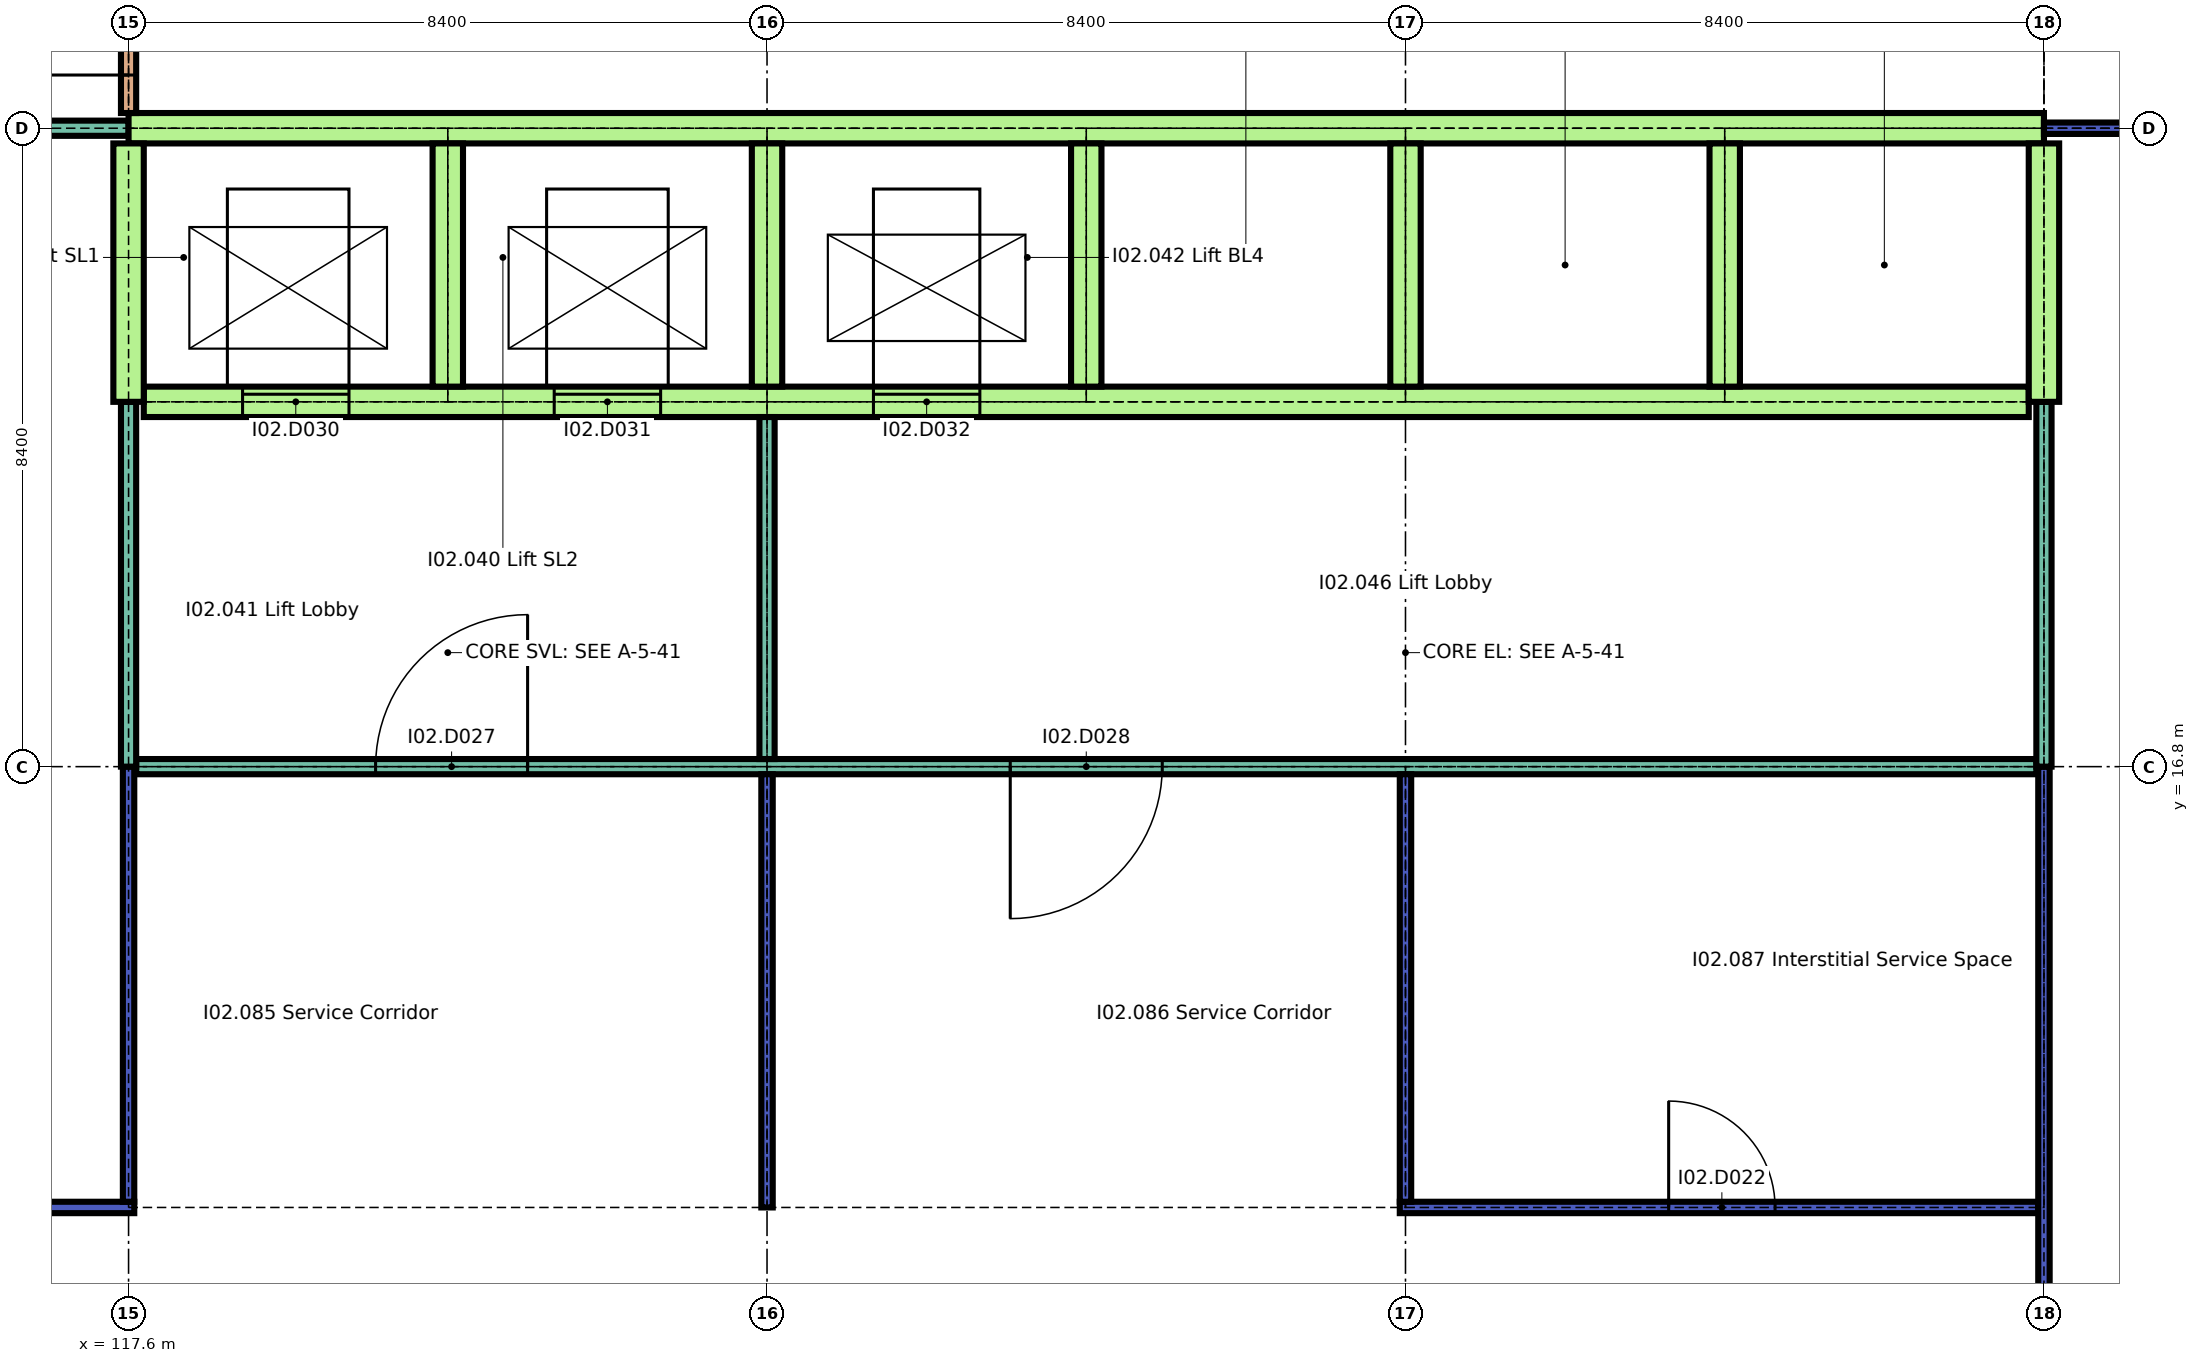
"""IFC4 building model, lengths in metres.
Left out: names, types, materials, properties, quantities, classifications, styles, units other than length and angle.
Written with IfcOpenShell. Run it as: python <this file> out.ifc"""

import sys

from ifc_helpers import new_model, si_unit, direction, frame, frame_2d, origin, place, context, subcontext, project, spatial, rectangle, extrude, element, fill, save


model = new_model("IFC4")
c1 = context("Model", 3, precision=1e-05, world=origin(), true_north=direction((0.0, 1.0)))
c2 = subcontext(c1, "Body", "Model", "MODEL_VIEW")
j1 = project(units=[si_unit("LENGTHUNIT", "METRE"), si_unit("PLANEANGLEUNIT", "RADIAN")], contexts=[c1])
p1 = place(None, origin())
s1 = spatial("IfcSite", under=j1, at=p1, CompositionType="ELEMENT")
p2 = place(p1, origin())
s2 = spatial("IfcBuilding", under=s1, at=p2, CompositionType="ELEMENT")
p3 = place(p2, frame((0.0, 0.0, 12.9)))
s3 = spatial("IfcBuildingStorey", under=s2, at=p3, CompositionType="ELEMENT", Elevation=12.9)
p4 = place(p3, frame((99.125, 11.0, 0.0), z_axis=(0.0, 0.0, 1.0), x_axis=(1.0, 0.0, 0.0)))
e1 = element("IfcWall", 1, at=p4, inside=s3, PredefinedType="PARTITIONING", context=c2, shape_type="SweptSolid", body=[
    extrude(rectangle(XDim=18.55, YDim=0.15, at=frame_2d((9.275, 0.0))), origin(), (0.0, 0.0, 1.0), 2.04),
])
p5 = place(p4, frame((8.575, 0.0, 0.0)))
e2 = element("IfcOpeningElement", 2, at=p5, cuts=e1, PredefinedType="OPENING", context=c2, shape_type="SweptSolid", body=[
    extrude(rectangle(XDim=1.4, YDim=2.0, at=frame_2d((0.7, 1.0))), frame((0.0, 0.085, 0.0), z_axis=(0.0, -1.0, 0.0), x_axis=(1.0, 0.0, 0.0)), (0.0, 0.0, 1.0), 0.17),
])
p6 = place(p3, frame((134.325, 11.0, 0.0), z_axis=(0.0, 0.0, 1.0), x_axis=(1.0, 0.0, 0.0)))
e3 = element("IfcWall", 3, at=p6, inside=s3, PredefinedType="PARTITIONING", context=c2, shape_type="SweptSolid", body=[
    extrude(rectangle(XDim=8.4, YDim=0.15, at=frame_2d((4.2, 0.0))), origin(), (0.0, 0.0, 1.0), 2.04),
])
p7 = place(p6, frame((3.538, 0.0, 0.0)))
e4 = element("IfcOpeningElement", 4, at=p7, cuts=e3, PredefinedType="OPENING", context=c2, shape_type="SweptSolid", body=[
    extrude(rectangle(XDim=1.4, YDim=2.0, at=frame_2d((0.7, 1.0))), frame((0.0, 0.085, 0.0), z_axis=(0.0, -1.0, 0.0), x_axis=(1.0, 0.0, 0.0)), (0.0, 0.0, 1.0), 0.17),
])
p8 = place(p3, frame((117.7, 16.8, 0.0), z_axis=(0.0, 0.0, 1.0), x_axis=(1.0, 0.0, 0.0)))
e5 = element("IfcWall", 5, at=p8, inside=s3, PredefinedType="PARTITIONING", context=c2, shape_type="SweptSolid", body=[
    extrude(rectangle(XDim=25.0, YDim=0.2, at=frame_2d((12.5, 0.0))), origin(), (0.0, 0.0, 1.0), 2.04),
])
p9 = place(p8, frame((3.15, 0.0, 0.0)))
e6 = element("IfcOpeningElement", 6, at=p9, cuts=e5, PredefinedType="OPENING", context=c2, shape_type="SweptSolid", body=[
    extrude(rectangle(XDim=2.0, YDim=2.0, at=frame_2d((1.0, 1.0))), frame((0.0, 0.11, 0.0), z_axis=(0.0, -1.0, 0.0), x_axis=(1.0, 0.0, 0.0)), (0.0, 0.0, 1.0), 0.22),
])
p10 = place(p8, frame((11.5, 0.0, 0.0)))
e7 = element("IfcOpeningElement", 7, at=p10, cuts=e5, PredefinedType="OPENING", context=c2, shape_type="SweptSolid", body=[
    extrude(rectangle(XDim=2.0, YDim=2.0, at=frame_2d((1.0, 1.0))), frame((0.0, 0.11, 0.0), z_axis=(0.0, -1.0, 0.0), x_axis=(1.0, 0.0, 0.0)), (0.0, 0.0, 1.0), 0.22),
])
p11 = place(p3, frame((117.8, 21.6, 0.0), z_axis=(0.0, 0.0, 1.0), x_axis=(1.0, 0.0, 0.0)))
e8 = element("IfcWall", 8, at=p11, inside=s3, PredefinedType="SHEAR", context=c2, shape_type="SweptSolid", body=[
    extrude(rectangle(XDim=24.8, YDim=0.4, at=frame_2d((12.4, 0.0))), origin(), (0.0, 0.0, 1.0), 2.04),
])
p12 = place(p11, frame((1.3, 0.0, 0.0)))
e9 = element("IfcOpeningElement", 9, at=p12, cuts=e8, PredefinedType="OPENING", context=c2, shape_type="SweptSolid", body=[
    extrude(rectangle(XDim=1.4, YDim=2.0, at=frame_2d((0.7, 1.0))), frame((0.0, 0.21, 0.0), z_axis=(0.0, -1.0, 0.0), x_axis=(1.0, 0.0, 0.0)), (0.0, 0.0, 1.0), 0.42),
])
p13 = place(p11, frame((5.4, 0.0, 0.0)))
e10 = element("IfcOpeningElement", 10, at=p13, cuts=e8, PredefinedType="OPENING", context=c2, shape_type="SweptSolid", body=[
    extrude(rectangle(XDim=1.4, YDim=2.0, at=frame_2d((0.7, 1.0))), frame((0.0, 0.21, 0.0), z_axis=(0.0, -1.0, 0.0), x_axis=(1.0, 0.0, 0.0)), (0.0, 0.0, 1.0), 0.42),
])
p14 = place(p11, frame((9.6, 0.0, 0.0)))
e11 = element("IfcOpeningElement", 11, at=p14, cuts=e8, PredefinedType="OPENING", context=c2, shape_type="SweptSolid", body=[
    extrude(rectangle(XDim=1.4, YDim=2.0, at=frame_2d((0.7, 1.0))), frame((0.0, 0.21, 0.0), z_axis=(0.0, -1.0, 0.0), x_axis=(1.0, 0.0, 0.0)), (0.0, 0.0, 1.0), 0.42),
])
p15 = place(p3, frame((109.2, 25.2, 0.0), z_axis=(0.0, 0.0, 1.0), x_axis=(1.0, 0.0, 0.0)))
e12 = element("IfcWall", 12, at=p15, inside=s3, PredefinedType="PARTITIONING", context=c2, shape_type="SweptSolid", body=[
    extrude(rectangle(XDim=8.4, YDim=0.2, at=frame_2d((4.2, 0.0))), origin(), (0.0, 0.0, 1.0), 2.04),
])
p16 = place(p3, frame((117.6, 25.2, 0.0), z_axis=(0.0, 0.0, 1.0), x_axis=(1.0, 0.0, 0.0)))
e13 = element("IfcWall", 13, at=p16, inside=s3, PredefinedType="SHEAR", context=c2, shape_type="SweptSolid", body=[
    extrude(rectangle(XDim=25.2, YDim=0.4, at=frame_2d((12.6, 0.0))), origin(), (0.0, 0.0, 1.0), 2.04),
])
p17 = place(p3, frame((142.8, 25.2, 0.0), z_axis=(0.0, 0.0, 1.0), x_axis=(1.0, 0.0, 0.0)))
e14 = element("IfcWall", 14, at=p17, inside=s3, PredefinedType="PARTITIONING", context=c2, shape_type="SweptSolid", body=[
    extrude(rectangle(XDim=7.975, YDim=0.15, at=frame_2d((3.987, 0.0))), origin(), (0.0, 0.0, 1.0), 2.04),
])
p18 = place(p3, frame((117.6, 11.075, 0.0), z_axis=(0.0, 0.0, 1.0), x_axis=(0.0, 1.0, 0.0)))
e15 = element("IfcWall", 15, at=p18, inside=s3, PredefinedType="PARTITIONING", context=c2, shape_type="SweptSolid", body=[
    extrude(rectangle(XDim=5.725, YDim=0.15, at=frame_2d((2.863, 0.0))), origin(), (0.0, 0.0, 1.0), 2.04),
])
p19 = place(p3, frame((117.6, 16.8, 0.0), z_axis=(0.0, 0.0, 1.0), x_axis=(0.0, 1.0, 0.0)))
e16 = element("IfcWall", 16, at=p19, inside=s3, PredefinedType="PARTITIONING", context=c2, shape_type="SweptSolid", body=[
    extrude(rectangle(XDim=4.8, YDim=0.2, at=frame_2d((2.4, 0.0))), origin(), (0.0, 0.0, 1.0), 2.04),
])
p20 = place(p3, frame((117.6, 21.6, 0.0), z_axis=(0.0, 0.0, 1.0), x_axis=(0.0, 1.0, 0.0)))
e17 = element("IfcWall", 17, at=p20, inside=s3, PredefinedType="SHEAR", context=c2, shape_type="SweptSolid", body=[
    extrude(rectangle(XDim=3.4, YDim=0.4, at=frame_2d((1.7, 0.0))), origin(), (0.0, 0.0, 1.0), 2.04),
])
p21 = place(p3, frame((117.6, 25.4, 0.0), z_axis=(0.0, 0.0, 1.0), x_axis=(0.0, 1.0, 0.0)))
e18 = element("IfcWall", 18, at=p21, inside=s3, PredefinedType="PARTITIONING", context=c2, shape_type="SweptSolid", body=[
    extrude(rectangle(XDim=4.6, YDim=0.2, at=frame_2d((2.3, 0.0))), origin(), (0.0, 0.0, 1.0), 2.1),
])
p22 = place(p21, frame((0.5, 0.0, 0.0)))
e19 = element("IfcOpeningElement", 19, at=p22, cuts=e18, PredefinedType="OPENING", context=c2, shape_type="SweptSolid", body=[
    extrude(rectangle(XDim=1.4, YDim=2.0, at=frame_2d((0.7, 1.0))), frame((0.0, 0.11, 0.0), z_axis=(0.0, -1.0, 0.0), x_axis=(1.0, 0.0, 0.0)), (0.0, 0.0, 1.0), 0.22),
])
p23 = place(p3, frame((121.8, 21.8, 0.0), z_axis=(0.0, 0.0, 1.0), x_axis=(0.0, 1.0, 0.0)))
e20 = element("IfcWall", 20, at=p23, inside=s3, PredefinedType="SHEAR", context=c2, shape_type="SweptSolid", body=[
    extrude(rectangle(XDim=3.2, YDim=0.4, at=frame_2d((1.6, 0.0))), origin(), (0.0, 0.0, 1.0), 2.04),
])
p24 = place(p3, frame((126.0, 11.0, 0.0), z_axis=(0.0, 0.0, 1.0), x_axis=(0.0, 1.0, 0.0)))
e21 = element("IfcWall", 21, at=p24, inside=s3, PredefinedType="PARTITIONING", context=c2, shape_type="SweptSolid", body=[
    extrude(rectangle(XDim=5.7, YDim=0.15, at=frame_2d((2.85, 0.0))), origin(), (0.0, 0.0, 1.0), 2.04),
])
p25 = place(p3, frame((126.0, 16.9, 0.0), z_axis=(0.0, 0.0, 1.0), x_axis=(0.0, 1.0, 0.0)))
e22 = element("IfcWall", 22, at=p25, inside=s3, PredefinedType="PARTITIONING", context=c2, shape_type="SweptSolid", body=[
    extrude(rectangle(XDim=4.5, YDim=0.2, at=frame_2d((2.25, 0.0))), origin(), (0.0, 0.0, 1.0), 2.04),
])
for number, where, z_axis, x_axis in (
    (23, (126.0, 21.8, 0.0), (0.0, 0.0, 1.0), (0.0, 1.0, 0.0)),
    (24, (130.2, 21.8, 0.0), (0.0, 0.0, 1.0), (0.0, 1.0, 0.0)),
):
    element("IfcWall", number, at=place(p3, frame(where, z_axis=z_axis, x_axis=x_axis)), inside=s3, PredefinedType="SHEAR", context=c2, shape_type="SweptSolid", body=[
        extrude(rectangle(XDim=3.2, YDim=0.4, at=frame_2d((1.6, 0.0))), origin(), (0.0, 0.0, 1.0), 2.04),
    ])
p26 = place(p3, frame((134.4, 11.075, 0.0), z_axis=(0.0, 0.0, 1.0), x_axis=(0.0, 1.0, 0.0)))
e25 = element("IfcWall", 25, at=p26, inside=s3, PredefinedType="PARTITIONING", context=c2, shape_type="SweptSolid", body=[
    extrude(rectangle(XDim=5.625, YDim=0.15, at=frame_2d((2.812, 0.0))), origin(), (0.0, 0.0, 1.0), 2.04),
])
for number, where, z_axis, x_axis in (
    (26, (134.4, 21.8, 0.0), (0.0, 0.0, 1.0), (0.0, 1.0, 0.0)),
    (27, (138.6, 21.8, 0.0), (0.0, 0.0, 1.0), (0.0, 1.0, 0.0)),
):
    element("IfcWall", number, at=place(p3, frame(where, z_axis=z_axis, x_axis=x_axis)), inside=s3, PredefinedType="SHEAR", context=c2, shape_type="SweptSolid", body=[
        extrude(rectangle(XDim=3.2, YDim=0.4, at=frame_2d((1.6, 0.0))), origin(), (0.0, 0.0, 1.0), 2.04),
    ])
p27 = place(p3, frame((142.8, 8.5, 0.0), z_axis=(0.0, 0.0, 1.0), x_axis=(0.0, 1.0, 0.0)))
e28 = element("IfcWall", 28, at=p27, inside=s3, PredefinedType="PARTITIONING", context=c2, shape_type="SweptSolid", body=[
    extrude(rectangle(XDim=8.3, YDim=0.15, at=frame_2d((4.15, 0.0))), origin(), (0.0, 0.0, 1.0), 2.04),
])
p28 = place(p3, frame((142.8, 16.8, 0.0), z_axis=(0.0, 0.0, 1.0), x_axis=(0.0, 1.0, 0.0)))
e29 = element("IfcWall", 29, at=p28, inside=s3, PredefinedType="PARTITIONING", context=c2, shape_type="SweptSolid", body=[
    extrude(rectangle(XDim=4.8, YDim=0.2, at=frame_2d((2.4, 0.0))), origin(), (0.0, 0.0, 1.0), 2.04),
])
p29 = place(p3, frame((142.8, 21.6, 0.0), z_axis=(0.0, 0.0, 1.0), x_axis=(0.0, 1.0, 0.0)))
e30 = element("IfcWall", 30, at=p29, inside=s3, PredefinedType="SHEAR", context=c2, shape_type="SweptSolid", body=[
    extrude(rectangle(XDim=3.4, YDim=0.4, at=frame_2d((1.7, 0.0))), origin(), (0.0, 0.0, 1.0), 2.04),
])
p30 = place(p7, origin())
e31 = element("IfcDoor", 31, at=p30, inside=s3, OperationType="SINGLE_SWING_RIGHT", PredefinedType="DOOR", context=c2, shape_type="SweptSolid", body=[
    extrude(rectangle(XDim=1.4, YDim=2.0, at=frame_2d((0.7, 1.0))), frame((0.0, 0.025, 0.0), z_axis=(0.0, -1.0, 0.0), x_axis=(1.0, 0.0, 0.0)), (0.0, 0.0, 1.0), 0.05),
])
fill(e4, e31)
p31 = place(p9, origin())
e32 = element("IfcDoor", 32, at=p31, inside=s3, OperationType="SINGLE_SWING_LEFT", PredefinedType="DOOR", context=c2, shape_type="SweptSolid", body=[
    extrude(rectangle(XDim=2.0, YDim=2.0, at=frame_2d((1.0, 1.0))), frame((0.0, 0.03, 0.0), z_axis=(0.0, -1.0, 0.0), x_axis=(1.0, 0.0, 0.0)), (0.0, 0.0, 1.0), 0.06),
])
fill(e6, e32)
p32 = place(p10, origin())
e33 = element("IfcDoor", 33, at=p32, inside=s3, OperationType="SINGLE_SWING_LEFT", PredefinedType="DOOR", context=c2, shape_type="SweptSolid", body=[
    extrude(rectangle(XDim=2.0, YDim=2.0, at=frame_2d((1.0, 1.0))), frame((0.0, 0.03, 0.0), z_axis=(0.0, -1.0, 0.0), x_axis=(1.0, 0.0, 0.0)), (0.0, 0.0, 1.0), 0.06),
])
fill(e7, e33)
p33 = place(p12, origin())
e34 = element("IfcDoor", 34, at=p33, inside=s3, OperationType="SLIDING_TO_LEFT", PredefinedType="DOOR", context=c2, shape_type="SweptSolid", body=[
    extrude(rectangle(XDim=1.4, YDim=2.0, at=frame_2d((0.7, 1.0))), frame((0.0, 0.025, 0.0), z_axis=(0.0, -1.0, 0.0), x_axis=(1.0, 0.0, 0.0)), (0.0, 0.0, 1.0), 0.05),
])
fill(e9, e34)
p34 = place(p13, origin())
e35 = element("IfcDoor", 35, at=p34, inside=s3, OperationType="SLIDING_TO_LEFT", PredefinedType="DOOR", context=c2, shape_type="SweptSolid", body=[
    extrude(rectangle(XDim=1.4, YDim=2.0, at=frame_2d((0.7, 1.0))), frame((0.0, 0.025, 0.0), z_axis=(0.0, -1.0, 0.0), x_axis=(1.0, 0.0, 0.0)), (0.0, 0.0, 1.0), 0.05),
])
fill(e10, e35)
p35 = place(p14, origin())
e36 = element("IfcDoor", 36, at=p35, inside=s3, OperationType="SLIDING_TO_LEFT", PredefinedType="DOOR", context=c2, shape_type="SweptSolid", body=[
    extrude(rectangle(XDim=1.4, YDim=2.0, at=frame_2d((0.7, 1.0))), frame((0.0, 0.025, 0.0), z_axis=(0.0, -1.0, 0.0), x_axis=(1.0, 0.0, 0.0)), (0.0, 0.0, 1.0), 0.05),
])
fill(e11, e36)
p36 = place(p22, origin())
e37 = element("IfcDoor", 37, at=p36, inside=s3, OperationType="SINGLE_SWING_RIGHT", PredefinedType="DOOR", context=c2, shape_type="SweptSolid", body=[
    extrude(rectangle(XDim=1.4, YDim=2.0, at=frame_2d((0.7, 1.0))), frame((0.0, 0.03, 0.0), z_axis=(0.0, -1.0, 0.0), x_axis=(1.0, 0.0, 0.0)), (0.0, 0.0, 1.0), 0.06),
])
fill(e19, e37)
save(model, sys.argv[1])
